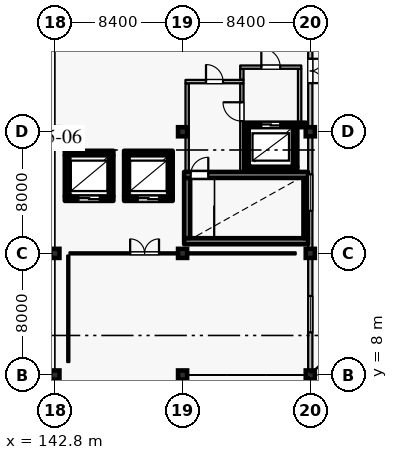
"""IFC4 building model, lengths in metres.
Left out: names, types, materials, properties, quantities, classifications, styles, units other than length and angle.
Written with IfcOpenShell. Run it as: python <this file> out.ifc"""

import sys

from ifc_helpers import new_model, si_unit, direction, frame, frame_2d, origin, origin_2d, place, context, subcontext, project, spatial, rectangle, extrude, element, fill, save


model = new_model("IFC4")
c1 = context("Model", 3, precision=1e-05, world=origin(), true_north=direction((0.0, 1.0)))
c2 = subcontext(c1, "Body", "Model", "MODEL_VIEW")
j1 = project(units=[si_unit("LENGTHUNIT", "METRE"), si_unit("PLANEANGLEUNIT", "RADIAN")], contexts=[c1])
p1 = place(None, origin())
s1 = spatial("IfcSite", under=j1, at=p1, CompositionType="ELEMENT")
p2 = place(p1, origin())
s2 = spatial("IfcBuilding", under=s1, at=p2, CompositionType="ELEMENT")
p3 = place(p2, frame((0.0, 0.0, 47.4)))
s3 = spatial("IfcBuildingStorey", under=s2, at=p3, CompositionType="ELEMENT", Elevation=47.4)
for number, where, z_axis, x_axis in (
    (1, (142.8, 16.0, 0.0), (0.0, 0.0, 1.0), (1.0, 0.0, 0.0)),
    (2, (151.2, 8.0, 0.0), (0.0, 0.0, 1.0), (1.0, 0.0, 0.0)),
    (3, (151.2, 24.0, 0.0), (0.0, 0.0, 1.0), (1.0, 0.0, 0.0)),
    (4, (159.6, 8.0, 0.0), (0.0, 0.0, 1.0), (1.0, 0.0, 0.0)),
    (5, (159.6, 24.0, 0.0), (0.0, 0.0, 1.0), (1.0, 0.0, 0.0)),
    (6, (142.8, 8.0, 0.0), (0.0, 0.0, 1.0), (1.0, 0.0, 0.0)),
    (7, (142.8, 24.0, 0.0), (0.0, 0.0, 1.0), (1.0, 0.0, 0.0)),
    (8, (151.2, 16.0, 0.0), (0.0, 0.0, 1.0), (1.0, 0.0, 0.0)),
    (9, (159.6, 16.0, 0.0), (0.0, 0.0, 1.0), (1.0, 0.0, 0.0)),
):
    element("IfcColumn", number, at=place(p3, frame(where, z_axis=z_axis, x_axis=x_axis)), inside=s3, PredefinedType="COLUMN", context=c2, shape_type="SweptSolid", body=[
        extrude(rectangle(XDim=0.6, YDim=0.6, at=origin_2d()), origin(), (0.0, 0.0, 1.0), 4.2),
    ])
p4 = place(p3, frame((159.6, 31.7, 0.0), z_axis=(0.0, 0.0, 1.0), x_axis=(0.0, -1.0, 0.0)))
e10 = element("IfcWall", 10, at=p4, inside=s3, PredefinedType="SOLIDWALL", context=c2, shape_type="SweptSolid", body=[
    extrude(rectangle(XDim=7.4, YDim=0.28, at=frame_2d((3.7, 0.0))), origin(), (0.0, 0.0, 1.0), 3.3),
])
p5 = place(p4, frame((2.9, 0.0, 0.0)))
e11 = element("IfcOpeningElement", 11, at=p5, cuts=e10, PredefinedType="OPENING", context=c2, shape_type="SweptSolid", body=[
    extrude(rectangle(XDim=1.6, YDim=2.25, at=frame_2d((0.8, 1.125))), frame((0.0, 0.15, 0.0), z_axis=(0.0, -1.0, 0.0), x_axis=(1.0, 0.0, 0.0)), (0.0, 0.0, 1.0), 0.3),
])
p6 = place(p3, frame((159.6, 23.7, 0.0), z_axis=(0.0, 0.0, 1.0), x_axis=(0.0, -1.0, 0.0)))
e12 = element("IfcWall", 12, at=p6, inside=s3, PredefinedType="SOLIDWALL", context=c2, shape_type="SweptSolid", body=[
    extrude(rectangle(XDim=7.4, YDim=0.28, at=frame_2d((3.7, 0.0))), origin(), (0.0, 0.0, 1.0), 3.3),
])
p7 = place(p6, frame((2.5, 0.0, 0.75)))
e13 = element("IfcOpeningElement", 13, at=p7, cuts=e12, PredefinedType="OPENING", context=c2, shape_type="SweptSolid", body=[
    extrude(rectangle(XDim=2.4, YDim=1.65, at=frame_2d((1.2, 0.825))), frame((0.0, 0.15, 0.0), z_axis=(0.0, -1.0, 0.0), x_axis=(1.0, 0.0, 0.0)), (0.0, 0.0, 1.0), 0.3),
])
p8 = place(p3, frame((159.6, 15.7, 0.0), z_axis=(0.0, 0.0, 1.0), x_axis=(0.0, -1.0, 0.0)))
e14 = element("IfcWall", 14, at=p8, inside=s3, PredefinedType="SOLIDWALL", context=c2, shape_type="SweptSolid", body=[
    extrude(rectangle(XDim=7.4, YDim=0.28, at=frame_2d((3.7, 0.0))), origin(), (0.0, 0.0, 1.0), 3.3),
])
p9 = place(p8, frame((2.5, 0.0, 0.75)))
e15 = element("IfcOpeningElement", 15, at=p9, cuts=e14, PredefinedType="OPENING", context=c2, shape_type="SweptSolid", body=[
    extrude(rectangle(XDim=2.4, YDim=1.65, at=frame_2d((1.2, 0.825))), frame((0.0, 0.15, 0.0), z_axis=(0.0, -1.0, 0.0), x_axis=(1.0, 0.0, 0.0)), (0.0, 0.0, 1.0), 0.3),
])
p10 = place(p3, frame((155.25, 21.55, 0.0), z_axis=(0.0, 0.0, 1.0), x_axis=(1.0, 0.0, 0.0)))
e16 = element("IfcWall", 16, at=p10, inside=s3, PredefinedType="SHEAR", context=c2, shape_type="SweptSolid", body=[
    extrude(rectangle(XDim=3.5, YDim=0.3, at=frame_2d((1.75, 0.0))), origin(), (0.0, 0.0, 1.0), 3.935),
])
p11 = place(p3, frame((158.6, 21.705, 0.0), z_axis=(0.0, 0.0, 1.0), x_axis=(0.0, 1.0, 0.0)))
e17 = element("IfcWall", 17, at=p11, inside=s3, PredefinedType="SHEAR", context=c2, shape_type="SweptSolid", body=[
    extrude(rectangle(XDim=2.59, YDim=0.3, at=frame_2d((1.295, 0.0))), origin(), (0.0, 0.0, 1.0), 3.935),
])
p12 = place(p3, frame((159.31, 24.45, 0.0), z_axis=(0.0, 0.0, 1.0), x_axis=(-1.0, 0.0, 0.0)))
e18 = element("IfcWall", 18, at=p12, inside=s3, PredefinedType="SHEAR", context=c2, shape_type="SweptSolid", body=[
    extrude(rectangle(XDim=4.06, YDim=0.3, at=frame_2d((2.03, 0.0))), origin(), (0.0, 0.0, 1.0), 3.935),
])
p13 = place(p12, frame((1.685, 0.0, 0.0)))
e19 = element("IfcOpeningElement", 19, at=p13, cuts=e18, PredefinedType="OPENING", context=c2, shape_type="SweptSolid", body=[
    extrude(rectangle(XDim=1.25, YDim=2.25, at=frame_2d((0.625, 1.125))), frame((0.0, 0.16, 0.0), z_axis=(0.0, -1.0, 0.0), x_axis=(1.0, 0.0, 0.0)), (0.0, 0.0, 1.0), 0.32),
])
p14 = place(p3, frame((155.4, 24.295, 0.0), z_axis=(0.0, 0.0, 1.0), x_axis=(0.0, -1.0, 0.0)))
e20 = element("IfcWall", 20, at=p14, inside=s3, PredefinedType="SHEAR", context=c2, shape_type="SweptSolid", body=[
    extrude(rectangle(XDim=2.59, YDim=0.3, at=frame_2d((1.295, 0.0))), origin(), (0.0, 0.0, 1.0), 3.935),
])
p15 = place(p3, frame((143.45, 19.6, 0.0), z_axis=(0.0, 0.0, 1.0), x_axis=(1.0, 0.0, 0.0)))
e21 = element("IfcWall", 21, at=p15, inside=s3, PredefinedType="SHEAR", context=c2, shape_type="SweptSolid", body=[
    extrude(rectangle(XDim=3.2, YDim=0.3, at=frame_2d((1.6, 0.0))), origin(), (0.0, 0.0, 1.0), 3.935),
])
p16 = place(p15, frame((0.9, 0.0, 0.0)))
e22 = element("IfcOpeningElement", 22, at=p16, cuts=e21, PredefinedType="OPENING", context=c2, shape_type="SweptSolid", body=[
    extrude(rectangle(XDim=1.4, YDim=2.35, at=frame_2d((0.7, 1.175))), frame((0.0, 0.16, 0.0), z_axis=(0.0, -1.0, 0.0), x_axis=(1.0, 0.0, 0.0)), (0.0, 0.0, 1.0), 0.32),
])
p17 = place(p3, frame((146.5, 19.755, 0.0), z_axis=(0.0, 0.0, 1.0), x_axis=(0.0, 1.0, 0.0)))
e23 = element("IfcWall", 23, at=p17, inside=s3, PredefinedType="SHEAR", context=c2, shape_type="SweptSolid", body=[
    extrude(rectangle(XDim=2.69, YDim=0.3, at=frame_2d((1.345, 0.0))), origin(), (0.0, 0.0, 1.0), 3.935),
])
p18 = place(p3, frame((146.65, 22.6, 0.0), z_axis=(0.0, 0.0, 1.0), x_axis=(-1.0, 0.0, 0.0)))
e24 = element("IfcWall", 24, at=p18, inside=s3, PredefinedType="SHEAR", context=c2, shape_type="SweptSolid", body=[
    extrude(rectangle(XDim=3.2, YDim=0.3, at=frame_2d((1.6, 0.0))), origin(), (0.0, 0.0, 1.0), 3.935),
])
p19 = place(p3, frame((143.6, 22.445, 0.0), z_axis=(0.0, 0.0, 1.0), x_axis=(0.0, -1.0, 0.0)))
e25 = element("IfcWall", 25, at=p19, inside=s3, PredefinedType="SHEAR", context=c2, shape_type="SweptSolid", body=[
    extrude(rectangle(XDim=2.69, YDim=0.3, at=frame_2d((1.345, 0.0))), origin(), (0.0, 0.0, 1.0), 3.935),
])
p20 = place(p3, frame((147.35, 19.6, 0.0), z_axis=(0.0, 0.0, 1.0), x_axis=(1.0, 0.0, 0.0)))
e26 = element("IfcWall", 26, at=p20, inside=s3, PredefinedType="SHEAR", context=c2, shape_type="SweptSolid", body=[
    extrude(rectangle(XDim=3.2, YDim=0.3, at=frame_2d((1.6, 0.0))), origin(), (0.0, 0.0, 1.0), 3.935),
])
p21 = place(p20, frame((0.9, 0.0, 0.0)))
e27 = element("IfcOpeningElement", 27, at=p21, cuts=e26, PredefinedType="OPENING", context=c2, shape_type="SweptSolid", body=[
    extrude(rectangle(XDim=1.4, YDim=2.35, at=frame_2d((0.7, 1.175))), frame((0.0, 0.16, 0.0), z_axis=(0.0, -1.0, 0.0), x_axis=(1.0, 0.0, 0.0)), (0.0, 0.0, 1.0), 0.32),
])
p22 = place(p3, frame((150.4, 19.755, 0.0), z_axis=(0.0, 0.0, 1.0), x_axis=(0.0, 1.0, 0.0)))
e28 = element("IfcWall", 28, at=p22, inside=s3, PredefinedType="SHEAR", context=c2, shape_type="SweptSolid", body=[
    extrude(rectangle(XDim=2.69, YDim=0.3, at=frame_2d((1.345, 0.0))), origin(), (0.0, 0.0, 1.0), 3.935),
])
p23 = place(p3, frame((150.55, 22.6, 0.0), z_axis=(0.0, 0.0, 1.0), x_axis=(-1.0, 0.0, 0.0)))
e29 = element("IfcWall", 29, at=p23, inside=s3, PredefinedType="SHEAR", context=c2, shape_type="SweptSolid", body=[
    extrude(rectangle(XDim=3.2, YDim=0.3, at=frame_2d((1.6, 0.0))), origin(), (0.0, 0.0, 1.0), 3.935),
])
p24 = place(p3, frame((147.5, 22.445, 0.0), z_axis=(0.0, 0.0, 1.0), x_axis=(0.0, -1.0, 0.0)))
e30 = element("IfcWall", 30, at=p24, inside=s3, PredefinedType="SHEAR", context=c2, shape_type="SweptSolid", body=[
    extrude(rectangle(XDim=2.69, YDim=0.3, at=frame_2d((1.345, 0.0))), origin(), (0.0, 0.0, 1.0), 3.935),
])
p25 = place(p3, frame((151.3, 16.8, 0.0), z_axis=(0.0, 0.0, 1.0), x_axis=(1.0, 0.0, 0.0)))
e31 = element("IfcWall", 31, at=p25, inside=s3, PredefinedType="SHEAR", context=c2, shape_type="SweptSolid", body=[
    extrude(rectangle(XDim=8.15, YDim=0.4, at=frame_2d((4.075, 0.0))), origin(), (0.0, 0.0, 1.0), 3.935),
])
p26 = place(p3, frame((159.3, 17.005, 0.0), z_axis=(0.0, 0.0, 1.0), x_axis=(0.0, 1.0, 0.0)))
e32 = element("IfcWall", 32, at=p26, inside=s3, PredefinedType="SHEAR", context=c2, shape_type="SweptSolid", body=[
    extrude(rectangle(XDim=3.95, YDim=0.3, at=frame_2d((1.975, 0.0))), origin(), (0.0, 0.0, 1.0), 3.935),
])
p27 = place(p3, frame((151.3, 21.16, 0.0), z_axis=(0.0, 0.0, 1.0), x_axis=(1.0, 0.0, 0.0)))
e33 = element("IfcWall", 33, at=p27, inside=s3, PredefinedType="SHEAR", context=c2, shape_type="SweptSolid", body=[
    extrude(rectangle(XDim=8.15, YDim=0.4, at=frame_2d((4.075, 0.0))), origin(), (0.0, 0.0, 1.0), 3.935),
])
p28 = place(p27, frame((0.43, 0.0, 0.0)))
e34 = element("IfcOpeningElement", 34, at=p28, cuts=e33, PredefinedType="OPENING", context=c2, shape_type="SweptSolid", body=[
    extrude(rectangle(XDim=1.16, YDim=2.2, at=frame_2d((0.58, 1.1))), frame((0.0, 0.21, 0.0), z_axis=(0.0, -1.0, 0.0), x_axis=(1.0, 0.0, 0.0)), (0.0, 0.0, 1.0), 0.42),
])
p29 = place(p3, frame((151.5, 17.005, 0.0), z_axis=(0.0, 0.0, 1.0), x_axis=(0.0, 1.0, 0.0)))
e35 = element("IfcWall", 35, at=p29, inside=s3, PredefinedType="SHEAR", context=c2, shape_type="SweptSolid", body=[
    extrude(rectangle(XDim=3.95, YDim=0.4, at=frame_2d((1.975, 0.0))), origin(), (0.0, 0.0, 1.0), 3.935),
])
p30 = place(p3, frame((151.5, 21.365, 0.0), z_axis=(0.0, 0.0, 1.0), x_axis=(0.0, 1.0, 0.0)))
e36 = element("IfcWall", 36, at=p30, inside=s3, PredefinedType="PARTITIONING", context=c2, shape_type="SweptSolid", body=[
    extrude(rectangle(XDim=5.82, YDim=0.22, at=frame_2d((2.91, 0.0))), origin(), (0.0, 0.0, 1.0), 3.935),
])
p31 = place(p3, frame((151.39, 27.3, 0.0), z_axis=(0.0, 0.0, 1.0), x_axis=(1.0, 0.0, 0.0)))
e37 = element("IfcWall", 37, at=p31, inside=s3, PredefinedType="PARTITIONING", context=c2, shape_type="SweptSolid", body=[
    extrude(rectangle(XDim=3.82, YDim=0.22, at=frame_2d((1.91, 0.0))), origin(), (0.0, 0.0, 1.0), 3.935),
])
p32 = place(p31, frame((1.35, 0.0, 0.0)))
e38 = element("IfcOpeningElement", 38, at=p32, cuts=e37, PredefinedType="OPENING", context=c2, shape_type="SweptSolid", body=[
    extrude(rectangle(XDim=1.12, YDim=2.2, at=frame_2d((0.56, 1.1))), frame((0.0, 0.12, 0.0), z_axis=(0.0, -1.0, 0.0), x_axis=(1.0, 0.0, 0.0)), (0.0, 0.0, 1.0), 0.24),
])
p33 = place(p3, frame((155.1, 21.365, 0.0), z_axis=(0.0, 0.0, 1.0), x_axis=(0.0, 1.0, 0.0)))
e39 = element("IfcWall", 39, at=p33, inside=s3, PredefinedType="PARTITIONING", context=c2, shape_type="SweptSolid", body=[
    extrude(rectangle(XDim=5.82, YDim=0.22, at=frame_2d((2.91, 0.0))), origin(), (0.0, 0.0, 1.0), 3.935),
])
p34 = place(p33, frame((3.335, 0.0, 0.0)))
e40 = element("IfcOpeningElement", 40, at=p34, cuts=e39, PredefinedType="OPENING", context=c2, shape_type="SweptSolid", body=[
    extrude(rectangle(XDim=1.24, YDim=2.2, at=frame_2d((0.62, 1.1))), frame((0.0, 0.12, 0.0), z_axis=(0.0, -1.0, 0.0), x_axis=(1.0, 0.0, 0.0)), (0.0, 0.0, 1.0), 0.24),
])
p35 = place(p3, frame((155.1, 27.415, 0.0), z_axis=(0.0, 0.0, 1.0), x_axis=(0.0, 1.0, 0.0)))
e41 = element("IfcWall", 41, at=p35, inside=s3, PredefinedType="PARTITIONING", context=c2, shape_type="SweptSolid", body=[
    extrude(rectangle(XDim=0.72, YDim=0.22, at=frame_2d((0.36, 0.0))), origin(), (0.0, 0.0, 1.0), 3.935),
])
p36 = place(p3, frame((158.9, 24.605, 0.0), z_axis=(0.0, 0.0, 1.0), x_axis=(0.0, 1.0, 0.0)))
e42 = element("IfcWall", 42, at=p36, inside=s3, PredefinedType="PARTITIONING", context=c2, shape_type="SweptSolid", body=[
    extrude(rectangle(XDim=3.53, YDim=0.22, at=frame_2d((1.765, 0.0))), origin(), (0.0, 0.0, 1.0), 3.935),
])
p37 = place(p3, frame((154.99, 28.25, 0.0), z_axis=(0.0, 0.0, 1.0), x_axis=(1.0, 0.0, 0.0)))
e43 = element("IfcWall", 43, at=p37, inside=s3, PredefinedType="PARTITIONING", context=c2, shape_type="SweptSolid", body=[
    extrude(rectangle(XDim=4.02, YDim=0.22, at=frame_2d((2.01, 0.0))), origin(), (0.0, 0.0, 1.0), 3.935),
])
p38 = place(p37, frame((1.39, 0.0, 0.0)))
e44 = element("IfcOpeningElement", 44, at=p38, cuts=e43, PredefinedType="OPENING", context=c2, shape_type="SweptSolid", body=[
    extrude(rectangle(XDim=1.24, YDim=2.2, at=frame_2d((0.62, 1.1))), frame((0.0, 0.12, 0.0), z_axis=(0.0, -1.0, 0.0), x_axis=(1.0, 0.0, 0.0)), (0.0, 0.0, 1.0), 0.24),
])
p39 = place(p3, frame((143.76, 16.0, 0.0), z_axis=(0.0, 0.0, 1.0), x_axis=(1.0, 0.0, 0.0)))
e45 = element("IfcWall", 45, at=p39, inside=s3, PredefinedType="PARTITIONING", context=c2, shape_type="SweptSolid", body=[
    extrude(rectangle(XDim=7.736, YDim=0.14, at=frame_2d((3.868, 0.0))), origin(), (0.0, 0.0, 1.0), 3.935),
])
p40 = place(p39, frame((3.99, 0.0, 0.0)))
e46 = element("IfcOpeningElement", 46, at=p40, cuts=e45, PredefinedType="OPENING", context=c2, shape_type="SweptSolid", body=[
    extrude(rectangle(XDim=1.9, YDim=2.4, at=frame_2d((0.95, 1.2))), frame((0.0, 0.08, 0.0), z_axis=(0.0, -1.0, 0.0), x_axis=(1.0, 0.0, 0.0)), (0.0, 0.0, 1.0), 0.16),
])
p41 = place(p3, frame((143.68, 8.85, 0.0), z_axis=(0.0, 0.0, 1.0), x_axis=(0.0, 1.0, 0.0)))
e47 = element("IfcWall", 47, at=p41, inside=s3, PredefinedType="PARTITIONING", context=c2, shape_type="SweptSolid", body=[
    extrude(rectangle(XDim=7.01, YDim=0.14, at=frame_2d((3.505, 0.0))), origin(), (0.0, 0.0, 1.0), 3.935),
])
p42 = place(p3, frame((151.496, 16.0, 0.0), z_axis=(0.0, 0.0, 1.0), x_axis=(1.0, 0.0, 0.0)))
e48 = element("IfcWall", 48, at=p42, inside=s3, PredefinedType="PARTITIONING", context=c2, shape_type="SweptSolid", body=[
    extrude(rectangle(XDim=7.144, YDim=0.14, at=frame_2d((3.572, 0.0))), origin(), (0.0, 0.0, 1.0), 3.39),
])
p43 = place(p5, origin())
e49 = element("IfcDoor", 49, at=p43, inside=s3, OperationType="DOUBLE_DOOR_SINGLE_SWING", PredefinedType="DOOR", context=c2, shape_type="SweptSolid", body=[
    extrude(rectangle(XDim=1.6, YDim=2.25, at=frame_2d((0.8, 1.125))), frame((0.0, 0.025, 0.0), z_axis=(0.0, -1.0, 0.0), x_axis=(1.0, 0.0, 0.0)), (0.0, 0.0, 1.0), 0.05),
])
fill(e11, e49)
p44 = place(p7, origin())
e50 = element("IfcWindow", 50, at=p44, inside=s3, PartitioningType="DOUBLE_PANEL_VERTICAL", PredefinedType="WINDOW", context=c2, shape_type="SweptSolid", body=[
    extrude(rectangle(XDim=2.4, YDim=1.65, at=frame_2d((1.2, 0.825))), frame((0.0, 0.03, 0.0), z_axis=(0.0, -1.0, 0.0), x_axis=(1.0, 0.0, 0.0)), (0.0, 0.0, 1.0), 0.06),
])
fill(e13, e50)
p45 = place(p9, origin())
e51 = element("IfcWindow", 51, at=p45, inside=s3, PartitioningType="DOUBLE_PANEL_VERTICAL", PredefinedType="WINDOW", context=c2, shape_type="SweptSolid", body=[
    extrude(rectangle(XDim=2.4, YDim=1.65, at=frame_2d((1.2, 0.825))), frame((0.0, 0.03, 0.0), z_axis=(0.0, -1.0, 0.0), x_axis=(1.0, 0.0, 0.0)), (0.0, 0.0, 1.0), 0.06),
])
fill(e15, e51)
p46 = place(p13, origin())
e52 = element("IfcDoor", 52, at=p46, inside=s3, OperationType="DOUBLE_DOOR_SLIDING", PredefinedType="DOOR", context=c2, shape_type="SweptSolid", body=[
    extrude(rectangle(XDim=1.25, YDim=2.25, at=frame_2d((0.625, 1.125))), frame((0.0, 0.025, 0.0), z_axis=(0.0, -1.0, 0.0), x_axis=(1.0, 0.0, 0.0)), (0.0, 0.0, 1.0), 0.05),
])
fill(e19, e52)
p47 = place(p16, origin())
e53 = element("IfcDoor", 53, at=p47, inside=s3, OperationType="DOUBLE_DOOR_SLIDING", PredefinedType="DOOR", context=c2, shape_type="SweptSolid", body=[
    extrude(rectangle(XDim=1.4, YDim=2.35, at=frame_2d((0.7, 1.175))), frame((0.0, 0.025, 0.0), z_axis=(0.0, -1.0, 0.0), x_axis=(1.0, 0.0, 0.0)), (0.0, 0.0, 1.0), 0.05),
])
fill(e22, e53)
p48 = place(p21, origin())
e54 = element("IfcDoor", 54, at=p48, inside=s3, OperationType="DOUBLE_DOOR_SLIDING", PredefinedType="DOOR", context=c2, shape_type="SweptSolid", body=[
    extrude(rectangle(XDim=1.4, YDim=2.35, at=frame_2d((0.7, 1.175))), frame((0.0, 0.025, 0.0), z_axis=(0.0, -1.0, 0.0), x_axis=(1.0, 0.0, 0.0)), (0.0, 0.0, 1.0), 0.05),
])
fill(e27, e54)
p49 = place(p28, origin())
e55 = element("IfcDoor", 55, at=p49, inside=s3, OperationType="SINGLE_SWING_RIGHT", PredefinedType="DOOR", context=c2, shape_type="SweptSolid", body=[
    extrude(rectangle(XDim=1.16, YDim=2.2, at=frame_2d((0.58, 1.1))), frame((0.0, 0.025, 0.0), z_axis=(0.0, -1.0, 0.0), x_axis=(1.0, 0.0, 0.0)), (0.0, 0.0, 1.0), 0.05),
])
fill(e34, e55)
p50 = place(p32, origin())
e56 = element("IfcDoor", 56, at=p50, inside=s3, OperationType="SINGLE_SWING_LEFT", PredefinedType="DOOR", context=c2, shape_type="SweptSolid", body=[
    extrude(rectangle(XDim=1.12, YDim=2.2, at=frame_2d((0.56, 1.1))), frame((0.0, 0.025, 0.0), z_axis=(0.0, -1.0, 0.0), x_axis=(1.0, 0.0, 0.0)), (0.0, 0.0, 1.0), 0.05),
])
fill(e38, e56)
p51 = place(p34, origin())
e57 = element("IfcDoor", 57, at=p51, inside=s3, OperationType="SINGLE_SWING_RIGHT", PredefinedType="DOOR", context=c2, shape_type="SweptSolid", body=[
    extrude(rectangle(XDim=1.24, YDim=2.2, at=frame_2d((0.62, 1.1))), frame((0.0, 0.025, 0.0), z_axis=(0.0, -1.0, 0.0), x_axis=(1.0, 0.0, 0.0)), (0.0, 0.0, 1.0), 0.05),
])
fill(e40, e57)
p52 = place(p38, origin())
e58 = element("IfcDoor", 58, at=p52, inside=s3, OperationType="SINGLE_SWING_LEFT", PredefinedType="DOOR", context=c2, shape_type="SweptSolid", body=[
    extrude(rectangle(XDim=1.24, YDim=2.2, at=frame_2d((0.62, 1.1))), frame((0.0, 0.025, 0.0), z_axis=(0.0, -1.0, 0.0), x_axis=(1.0, 0.0, 0.0)), (0.0, 0.0, 1.0), 0.05),
])
fill(e44, e58)
p53 = place(p40, origin())
e59 = element("IfcDoor", 59, at=p53, inside=s3, OperationType="DOUBLE_DOOR_SINGLE_SWING", PredefinedType="DOOR", context=c2, shape_type="SweptSolid", body=[
    extrude(rectangle(XDim=1.9, YDim=2.4, at=frame_2d((0.95, 1.2))), frame((0.0, 0.025, 0.0), z_axis=(0.0, -1.0, 0.0), x_axis=(1.0, 0.0, 0.0)), (0.0, 0.0, 1.0), 0.05),
])
fill(e46, e59)
save(model, sys.argv[1])
